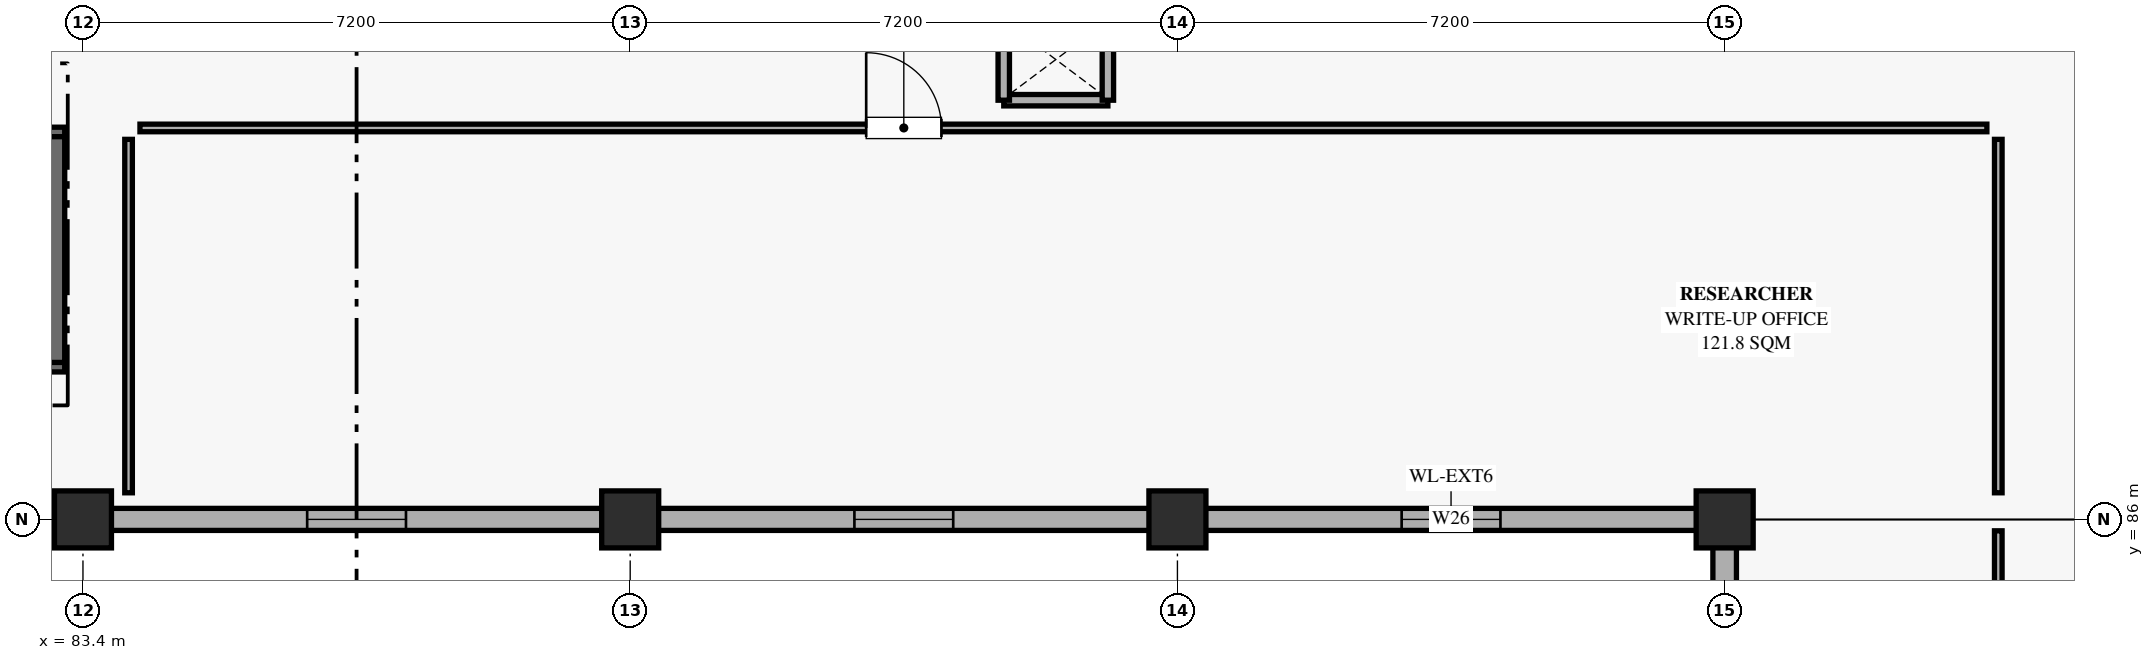
"""IFC4 building model, lengths in metres.
Left out: names, types, materials, properties, quantities, classifications, styles, units other than length and angle.
Written with IfcOpenShell. Run it as: python <this file> out.ifc"""

import sys

from ifc_helpers import new_model, si_unit, direction, frame, frame_2d, origin, origin_2d, place, context, subcontext, project, spatial, rectangle, extrude, element, fill, save


model = new_model("IFC4")
c1 = context("Model", 3, precision=1e-05, world=origin(), true_north=direction((0.0, 1.0)))
c2 = subcontext(c1, "Body", "Model", "MODEL_VIEW")
j1 = project(units=[si_unit("LENGTHUNIT", "METRE"), si_unit("PLANEANGLEUNIT", "RADIAN")], contexts=[c1])
p1 = place(None, origin())
s1 = spatial("IfcSite", under=j1, at=p1, CompositionType="ELEMENT")
p2 = place(p1, origin())
s2 = spatial("IfcBuilding", under=s1, at=p2, CompositionType="ELEMENT")
p3 = place(p2, frame((0.0, 0.0, 15.12)))
s3 = spatial("IfcBuildingStorey", under=s2, at=p3, CompositionType="ELEMENT", Elevation=15.12)
for number, where, z_axis, x_axis in (
    (1, (83.4, 86.0, 0.0), (0.0, 0.0, 1.0), (1.0, 0.0, 0.0)),
    (2, (90.6, 86.0, 0.0), (0.0, 0.0, 1.0), (1.0, 0.0, 0.0)),
    (3, (97.8, 86.0, 0.0), (0.0, 0.0, 1.0), (1.0, 0.0, 0.0)),
    (4, (105.0, 86.0, 0.0), (0.0, 0.0, 1.0), (1.0, 0.0, 0.0)),
):
    element("IfcColumn", number, at=place(p3, frame(where, z_axis=z_axis, x_axis=x_axis)), inside=s3, PredefinedType="COLUMN", context=c2, shape_type="SweptSolid", body=[
        extrude(rectangle(XDim=0.75, YDim=0.75, at=origin_2d()), origin(), (0.0, 0.0, 1.0), 4.68),
    ])
p4 = place(p3, frame((105.0, 79.16, 0.0), z_axis=(0.0, 0.0, 1.0), x_axis=(0.0, 1.0, 0.0)))
e5 = element("IfcWall", 5, at=p4, inside=s3, PredefinedType="SOLIDWALL", context=c2, shape_type="SweptSolid", body=[
    extrude(rectangle(XDim=6.48, YDim=0.31, at=frame_2d((3.24, 0.0))), origin(), (0.0, 0.0, 1.0), 3.18),
])
p5 = place(p4, frame((2.29, 0.0, 0.85)))
e6 = element("IfcOpeningElement", 6, at=p5, cuts=e5, PredefinedType="OPENING", context=c2, shape_type="SweptSolid", body=[
    extrude(rectangle(XDim=1.9, YDim=2.0, at=frame_2d((0.95, 1.0))), frame((0.0, 0.165, 0.0), z_axis=(0.0, -1.0, 0.0), x_axis=(1.0, 0.0, 0.0)), (0.0, 0.0, 1.0), 0.33),
])
p6 = place(p3, frame((104.64, 86.0, 0.0), z_axis=(0.0, 0.0, 1.0), x_axis=(-1.0, 0.0, 0.0)))
e7 = element("IfcWall", 7, at=p6, inside=s3, PredefinedType="SOLIDWALL", context=c2, shape_type="SweptSolid", body=[
    extrude(rectangle(XDim=6.48, YDim=0.29, at=frame_2d((3.24, 0.0))), origin(), (0.0, 0.0, 1.0), 3.18),
])
p7 = place(p6, frame((2.59, 0.0, 0.85)))
e8 = element("IfcOpeningElement", 8, at=p7, cuts=e7, PredefinedType="OPENING", context=c2, shape_type="SweptSolid", body=[
    extrude(rectangle(XDim=1.3, YDim=1.9, at=frame_2d((0.65, 0.95))), frame((0.0, 0.155, 0.0), z_axis=(0.0, -1.0, 0.0), x_axis=(1.0, 0.0, 0.0)), (0.0, 0.0, 1.0), 0.31),
])
p8 = place(p3, frame((97.44, 86.0, 0.0), z_axis=(0.0, 0.0, 1.0), x_axis=(-1.0, 0.0, 0.0)))
e9 = element("IfcWall", 9, at=p8, inside=s3, PredefinedType="SOLIDWALL", context=c2, shape_type="SweptSolid", body=[
    extrude(rectangle(XDim=6.48, YDim=0.29, at=frame_2d((3.24, 0.0))), origin(), (0.0, 0.0, 1.0), 3.18),
])
p9 = place(p8, frame((2.59, 0.0, 0.85)))
e10 = element("IfcOpeningElement", 10, at=p9, cuts=e9, PredefinedType="OPENING", context=c2, shape_type="SweptSolid", body=[
    extrude(rectangle(XDim=1.3, YDim=1.9, at=frame_2d((0.65, 0.95))), frame((0.0, 0.155, 0.0), z_axis=(0.0, -1.0, 0.0), x_axis=(1.0, 0.0, 0.0)), (0.0, 0.0, 1.0), 0.31),
])
p10 = place(p3, frame((90.24, 86.0, 0.0), z_axis=(0.0, 0.0, 1.0), x_axis=(-1.0, 0.0, 0.0)))
e11 = element("IfcWall", 11, at=p10, inside=s3, PredefinedType="SOLIDWALL", context=c2, shape_type="SweptSolid", body=[
    extrude(rectangle(XDim=6.48, YDim=0.29, at=frame_2d((3.24, 0.0))), origin(), (0.0, 0.0, 1.0), 3.18),
])
p11 = place(p10, frame((2.59, 0.0, 0.85)))
e12 = element("IfcOpeningElement", 12, at=p11, cuts=e11, PredefinedType="OPENING", context=c2, shape_type="SweptSolid", body=[
    extrude(rectangle(XDim=1.3, YDim=1.9, at=frame_2d((0.65, 0.95))), frame((0.0, 0.155, 0.0), z_axis=(0.0, -1.0, 0.0), x_axis=(1.0, 0.0, 0.0)), (0.0, 0.0, 1.0), 0.31),
])
p12 = place(p3, frame((83.04, 86.0, 0.0), z_axis=(0.0, 0.0, 1.0), x_axis=(-1.0, 0.0, 0.0)))
e13 = element("IfcWall", 13, at=p12, inside=s3, PredefinedType="SOLIDWALL", context=c2, shape_type="SweptSolid", body=[
    extrude(rectangle(XDim=6.48, YDim=0.29, at=frame_2d((3.24, 0.0))), origin(), (0.0, 0.0, 1.0), 3.18),
])
p13 = place(p12, frame((2.59, 0.0, 0.85)))
e14 = element("IfcOpeningElement", 14, at=p13, cuts=e13, PredefinedType="OPENING", context=c2, shape_type="SweptSolid", body=[
    extrude(rectangle(XDim=1.3, YDim=1.9, at=frame_2d((0.65, 0.95))), frame((0.0, 0.155, 0.0), z_axis=(0.0, -1.0, 0.0), x_axis=(1.0, 0.0, 0.0)), (0.0, 0.0, 1.0), 0.31),
])
p14 = place(p3, frame((96.885, 91.515, 0.0), z_axis=(0.0, 0.0, 1.0), x_axis=(-1.0, 0.0, 0.0)))
e15 = element("IfcWall", 15, at=p14, inside=s3, PredefinedType="PARTITIONING", context=c2, shape_type="SweptSolid", body=[
    extrude(rectangle(XDim=1.37, YDim=0.15, at=frame_2d((0.685, 0.0))), origin(), (0.0, 0.0, 1.0), 3.16),
])
for number, where, z_axis, x_axis in (
    (16, (95.515, 91.515, 0.0), (0.0, 0.0, 1.0), (0.0, 1.0, 0.0)),
    (17, (96.885, 92.585, 0.0), (0.0, 0.0, 1.0), (0.0, -1.0, 0.0)),
):
    element("IfcWall", number, at=place(p3, frame(where, z_axis=z_axis, x_axis=x_axis)), inside=s3, PredefinedType="PARTITIONING", context=c2, shape_type="SweptSolid", body=[
        extrude(rectangle(XDim=1.07, YDim=0.15, at=frame_2d((0.535, 0.0))), origin(), (0.0, 0.0, 1.0), 3.16),
    ])
p15 = place(p3, frame((83.16, 88.065, 0.0), z_axis=(0.0, 0.0, 1.0), x_axis=(-1.0, 0.0, 0.0)))
e18 = element("IfcWall", 18, at=p15, inside=s3, PredefinedType="SHEAR", context=c2, shape_type="SweptSolid", body=[
    extrude(rectangle(XDim=2.62, YDim=0.25, at=frame_2d((1.31, 0.0))), origin(), (0.0, 0.0, 1.0), 4.41),
])
p16 = place(p3, frame((80.54, 91.035, 0.0), z_axis=(0.0, 0.0, 1.0), x_axis=(1.0, 0.0, 0.0)))
e19 = element("IfcWall", 19, at=p16, inside=s3, PredefinedType="SHEAR", context=c2, shape_type="SweptSolid", body=[
    extrude(rectangle(XDim=2.62, YDim=0.25, at=frame_2d((1.31, 0.0))), origin(), (0.0, 0.0, 1.0), 4.41),
])
p17 = place(p16, frame((0.76, 0.0, 0.0)))
e20 = element("IfcOpeningElement", 20, at=p17, cuts=e19, PredefinedType="OPENING", context=c2, shape_type="SweptSolid", body=[
    extrude(rectangle(XDim=1.1, YDim=2.2, at=frame_2d((0.55, 1.1))), frame((0.0, 0.135, 0.0), z_axis=(0.0, -1.0, 0.0), x_axis=(1.0, 0.0, 0.0)), (0.0, 0.0, 1.0), 0.27),
])
p18 = place(p3, frame((83.035, 91.035, 0.0), z_axis=(0.0, 0.0, 1.0), x_axis=(0.0, -1.0, 0.0)))
e21 = element("IfcWall", 21, at=p18, inside=s3, PredefinedType="SHEAR", context=c2, shape_type="SweptSolid", body=[
    extrude(rectangle(XDim=2.97, YDim=0.25, at=frame_2d((1.485, 0.0))), origin(), (0.0, 0.0, 1.0), 4.41),
])
p19 = place(p3, frame((108.6, 85.85, 0.0), z_axis=(0.0, 0.0, 1.0), x_axis=(0.0, -1.0, 0.0)))
e22 = element("IfcWall", 22, at=p19, inside=s3, PredefinedType="PARTITIONING", context=c2, shape_type="SweptSolid", body=[
    extrude(rectangle(XDim=21.3, YDim=0.1, at=frame_2d((10.65, 0.0))), origin(), (0.0, 0.0, 1.0), 3.16),
])
p20 = place(p19, frame((10.17, 0.0, 0.0)))
e23 = element("IfcOpeningElement", 23, at=p20, cuts=e22, PredefinedType="OPENING", context=c2, shape_type="SweptSolid", body=[
    extrude(rectangle(XDim=0.96, YDim=2.22, at=frame_2d((0.48, 1.11))), frame((0.0, 0.06, 0.0), z_axis=(0.0, -1.0, 0.0), x_axis=(1.0, 0.0, 0.0)), (0.0, 0.0, 1.0), 0.12),
])
p21 = place(p3, frame((84.15, 91.15, 0.0), z_axis=(0.0, 0.0, 1.0), x_axis=(1.0, 0.0, 0.0)))
e24 = element("IfcWall", 24, at=p21, inside=s3, PredefinedType="PARTITIONING", context=c2, shape_type="SweptSolid", body=[
    extrude(rectangle(XDim=24.3, YDim=0.1, at=frame_2d((12.15, 0.0))), origin(), (0.0, 0.0, 1.0), 3.16),
])
p22 = place(p21, frame((9.555, 0.0, 0.0)))
e25 = element("IfcOpeningElement", 25, at=p22, cuts=e24, PredefinedType="OPENING", context=c2, shape_type="SweptSolid", body=[
    extrude(rectangle(XDim=0.99, YDim=2.16, at=frame_2d((0.495, 1.08))), frame((0.0, 0.06, 0.0), z_axis=(0.0, -1.0, 0.0), x_axis=(1.0, 0.0, 0.0)), (0.0, 0.0, 1.0), 0.12),
])
for number, where, z_axis, x_axis in (
    (26, (84.0, 86.35, 0.0), (0.0, 0.0, 1.0), (0.0, 1.0, 0.0)),
    (27, (108.6, 91.0, 0.0), (0.0, 0.0, 1.0), (0.0, -1.0, 0.0)),
):
    element("IfcWall", number, at=place(p3, frame(where, z_axis=z_axis, x_axis=x_axis)), inside=s3, PredefinedType="PARTITIONING", context=c2, shape_type="SweptSolid", body=[
        extrude(rectangle(XDim=4.65, YDim=0.1, at=frame_2d((2.325, 0.0))), origin(), (0.0, 0.0, 1.0), 3.16),
    ])
p23 = place(p7, origin())
e28 = element("IfcWindow", 28, at=p23, inside=s3, PartitioningType="SINGLE_PANEL", PredefinedType="WINDOW", context=c2, shape_type="SweptSolid", body=[
    extrude(rectangle(XDim=1.3, YDim=1.9, at=frame_2d((0.65, 0.95))), frame((0.0, 0.03, 0.0), z_axis=(0.0, -1.0, 0.0), x_axis=(1.0, 0.0, 0.0)), (0.0, 0.0, 1.0), 0.06),
])
fill(e8, e28)
p24 = place(p9, origin())
e29 = element("IfcWindow", 29, at=p24, inside=s3, PartitioningType="SINGLE_PANEL", PredefinedType="WINDOW", context=c2, shape_type="SweptSolid", body=[
    extrude(rectangle(XDim=1.3, YDim=1.9, at=frame_2d((0.65, 0.95))), frame((0.0, 0.03, 0.0), z_axis=(0.0, -1.0, 0.0), x_axis=(1.0, 0.0, 0.0)), (0.0, 0.0, 1.0), 0.06),
])
fill(e10, e29)
p25 = place(p11, origin())
e30 = element("IfcWindow", 30, at=p25, inside=s3, PartitioningType="SINGLE_PANEL", PredefinedType="WINDOW", context=c2, shape_type="SweptSolid", body=[
    extrude(rectangle(XDim=1.3, YDim=1.9, at=frame_2d((0.65, 0.95))), frame((0.0, 0.03, 0.0), z_axis=(0.0, -1.0, 0.0), x_axis=(1.0, 0.0, 0.0)), (0.0, 0.0, 1.0), 0.06),
])
fill(e12, e30)
p26 = place(p22, origin())
e31 = element("IfcDoor", 31, at=p26, inside=s3, OperationType="SINGLE_SWING_LEFT", PredefinedType="DOOR", context=c2, shape_type="SweptSolid", body=[
    extrude(rectangle(XDim=0.99, YDim=2.16, at=frame_2d((0.495, 1.08))), frame((0.0, 0.025, 0.0), z_axis=(0.0, -1.0, 0.0), x_axis=(1.0, 0.0, 0.0)), (0.0, 0.0, 1.0), 0.05),
])
fill(e25, e31)
save(model, sys.argv[1])
